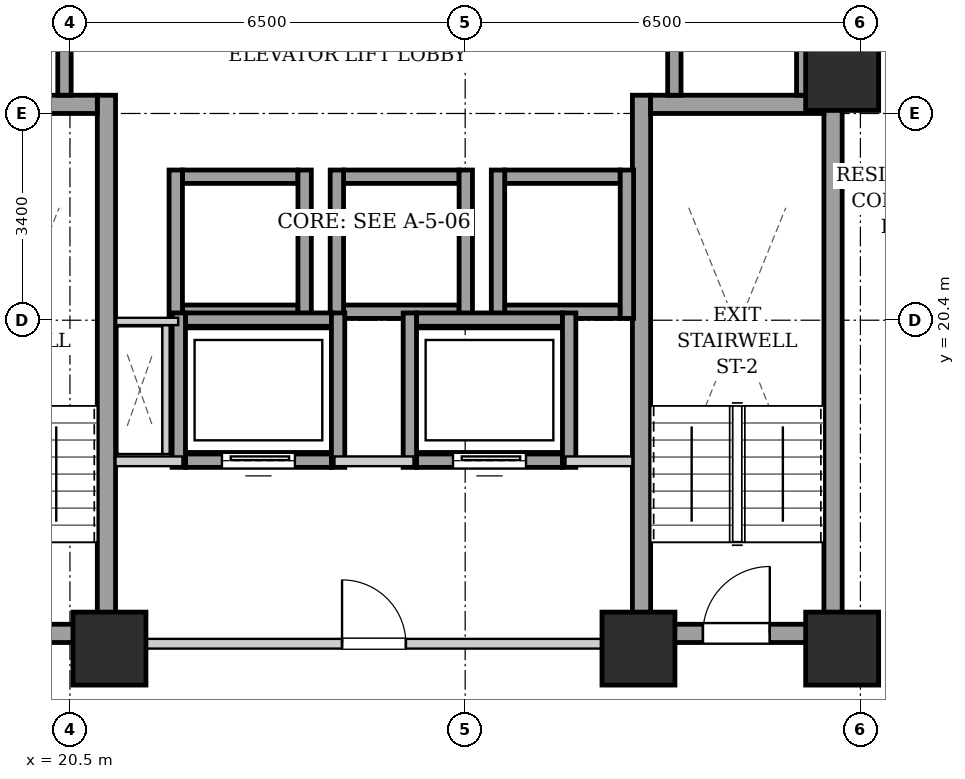
"""IFC4 building model, lengths in metres.
Left out: names, types, materials, properties, quantities, classifications, styles, units other than length and angle.
Written with IfcOpenShell. Run it as: python <this file> out.ifc"""

import sys

from ifc_helpers import new_model, si_unit, direction, frame, frame_2d, origin, origin_2d, place, context, subcontext, project, spatial, rectangle, extrude, element, fill, save


model = new_model("IFC4")
c1 = context("Model", 3, precision=1e-05, world=origin(), true_north=direction((0.0, 1.0)))
c2 = subcontext(c1, "Body", "Model", "MODEL_VIEW")
j1 = project(units=[si_unit("LENGTHUNIT", "METRE"), si_unit("PLANEANGLEUNIT", "RADIAN")], contexts=[c1])
p1 = place(None, origin())
s1 = spatial("IfcSite", under=j1, at=p1, CompositionType="ELEMENT")
p2 = place(p1, origin())
s2 = spatial("IfcBuilding", under=s1, at=p2, CompositionType="ELEMENT")
p3 = place(p2, frame((0.0, 0.0, 32.2)))
s3 = spatial("IfcBuildingStorey", under=s2, at=p3, CompositionType="ELEMENT", Elevation=32.2)
for number, where, z_axis, x_axis in (
    (1, (21.15, 15.0, 0.0), (0.0, 0.0, 1.0), (1.0, 0.0, 0.0)),
    (2, (29.85, 15.0, 0.0), (0.0, 0.0, 1.0), (1.0, 0.0, 0.0)),
    (3, (33.2, 15.0, 0.0), (0.0, 0.0, 1.0), (1.0, 0.0, 0.0)),
    (4, (33.2, 24.45, 0.0), (0.0, 0.0, 1.0), (1.0, 0.0, 0.0)),
):
    element("IfcColumn", number, at=place(p3, frame(where, z_axis=z_axis, x_axis=x_axis)), inside=s3, PredefinedType="COLUMN", context=c2, shape_type="SweptSolid", body=[
        extrude(rectangle(XDim=1.2, YDim=1.2, at=origin_2d()), origin(), (0.0, 0.0, 1.0), 3.2),
    ])
p4 = place(p3, frame((21.1, 15.1, 0.0), z_axis=(0.0, 0.0, 1.0), x_axis=(0.0, 1.0, 0.0)))
e5 = element("IfcWall", 5, at=p4, inside=s3, PredefinedType="SHEAR", context=c2, shape_type="SweptSolid", body=[
    extrude(rectangle(XDim=9.0, YDim=0.3, at=frame_2d((4.5, 0.0))), origin(), (0.0, 0.0, 1.0), 2.94),
])
p5 = place(p3, frame((18.1, 23.95, 0.0), z_axis=(0.0, 0.0, 1.0), x_axis=(1.0, 0.0, 0.0)))
e6 = element("IfcWall", 6, at=p5, inside=s3, PredefinedType="SHEAR", context=c2, shape_type="SweptSolid", body=[
    extrude(rectangle(XDim=2.85, YDim=0.3, at=frame_2d((1.425, 0.0))), origin(), (0.0, 0.0, 1.0), 2.94),
])
p6 = place(p3, frame((18.1, 15.25, 0.0), z_axis=(0.0, 0.0, 1.0), x_axis=(1.0, 0.0, 0.0)))
e7 = element("IfcWall", 7, at=p6, inside=s3, PredefinedType="SHEAR", context=c2, shape_type="SweptSolid", body=[
    extrude(rectangle(XDim=2.85, YDim=0.3, at=frame_2d((1.425, 0.0))), origin(), (0.0, 0.0, 1.0), 2.94),
])
p7 = place(p6, frame((0.86, 0.0, 0.0)))
e8 = element("IfcOpeningElement", 8, at=p7, cuts=e7, PredefinedType="OPENING", context=c2, shape_type="SweptSolid", body=[
    extrude(rectangle(XDim=1.1, YDim=2.05, at=frame_2d((0.55, 1.025))), frame((0.0, 0.16, 0.0), z_axis=(0.0, -1.0, 0.0), x_axis=(1.0, 0.0, 0.0)), (0.0, 0.0, 1.0), 0.32),
])
for number, where, z_axis, x_axis in (
    (9, (29.9, 15.1, 0.0), (0.0, 0.0, 1.0), (0.0, 1.0, 0.0)),
    (10, (33.05, 15.1, 0.0), (0.0, 0.0, 1.0), (0.0, 1.0, 0.0)),
):
    element("IfcWall", number, at=place(p3, frame(where, z_axis=z_axis, x_axis=x_axis)), inside=s3, PredefinedType="SHEAR", context=c2, shape_type="SweptSolid", body=[
        extrude(rectangle(XDim=9.0, YDim=0.3, at=frame_2d((4.5, 0.0))), origin(), (0.0, 0.0, 1.0), 2.94),
    ])
p8 = place(p3, frame((30.05, 23.95, 0.0), z_axis=(0.0, 0.0, 1.0), x_axis=(1.0, 0.0, 0.0)))
e11 = element("IfcWall", 11, at=p8, inside=s3, PredefinedType="SHEAR", context=c2, shape_type="SweptSolid", body=[
    extrude(rectangle(XDim=2.85, YDim=0.3, at=frame_2d((1.425, 0.0))), origin(), (0.0, 0.0, 1.0), 2.94),
])
p9 = place(p3, frame((30.05, 15.25, 0.0), z_axis=(0.0, 0.0, 1.0), x_axis=(1.0, 0.0, 0.0)))
e12 = element("IfcWall", 12, at=p9, inside=s3, PredefinedType="SHEAR", context=c2, shape_type="SweptSolid", body=[
    extrude(rectangle(XDim=2.85, YDim=0.3, at=frame_2d((1.425, 0.0))), origin(), (0.0, 0.0, 1.0), 2.94),
])
p10 = place(p9, frame((0.86, 0.0, 0.0)))
e13 = element("IfcOpeningElement", 13, at=p10, cuts=e12, PredefinedType="OPENING", context=c2, shape_type="SweptSolid", body=[
    extrude(rectangle(XDim=1.1, YDim=2.05, at=frame_2d((0.55, 1.025))), frame((0.0, 0.16, 0.0), z_axis=(0.0, -1.0, 0.0), x_axis=(1.0, 0.0, 0.0)), (0.0, 0.0, 1.0), 0.32),
])
for number, where, z_axis, x_axis in (
    (14, (22.35, 20.54, 0.0), (0.0, 0.0, 1.0), (1.0, 0.0, 0.0)),
    (15, (22.35, 22.76, 0.0), (0.0, 0.0, 1.0), (1.0, 0.0, 0.0)),
):
    element("IfcWall", number, at=place(p3, frame(where, z_axis=z_axis, x_axis=x_axis)), inside=s3, PredefinedType="SHEAR", context=c2, shape_type="SweptSolid", body=[
        extrude(rectangle(XDim=1.9, YDim=0.22, at=frame_2d((0.95, 0.0))), origin(), (0.0, 0.0, 1.0), 2.94),
    ])
for number, where, z_axis, x_axis in (
    (16, (22.24, 20.43, 0.0), (0.0, 0.0, 1.0), (0.0, 1.0, 0.0)),
    (17, (24.36, 20.43, 0.0), (0.0, 0.0, 1.0), (0.0, 1.0, 0.0)),
):
    element("IfcWall", number, at=place(p3, frame(where, z_axis=z_axis, x_axis=x_axis)), inside=s3, PredefinedType="SHEAR", context=c2, shape_type="SweptSolid", body=[
        extrude(rectangle(XDim=2.44, YDim=0.22, at=frame_2d((1.22, 0.0))), origin(), (0.0, 0.0, 1.0), 2.94),
    ])
for number, where, z_axis, x_axis in (
    (18, (25.0, 20.54, 0.0), (0.0, 0.0, 1.0), (1.0, 0.0, 0.0)),
    (19, (25.0, 22.76, 0.0), (0.0, 0.0, 1.0), (1.0, 0.0, 0.0)),
):
    element("IfcWall", number, at=place(p3, frame(where, z_axis=z_axis, x_axis=x_axis)), inside=s3, PredefinedType="SHEAR", context=c2, shape_type="SweptSolid", body=[
        extrude(rectangle(XDim=1.9, YDim=0.22, at=frame_2d((0.95, 0.0))), origin(), (0.0, 0.0, 1.0), 2.94),
    ])
for number, where, z_axis, x_axis in (
    (20, (24.89, 20.43, 0.0), (0.0, 0.0, 1.0), (0.0, 1.0, 0.0)),
    (21, (27.01, 20.43, 0.0), (0.0, 0.0, 1.0), (0.0, 1.0, 0.0)),
):
    element("IfcWall", number, at=place(p3, frame(where, z_axis=z_axis, x_axis=x_axis)), inside=s3, PredefinedType="SHEAR", context=c2, shape_type="SweptSolid", body=[
        extrude(rectangle(XDim=2.44, YDim=0.22, at=frame_2d((1.22, 0.0))), origin(), (0.0, 0.0, 1.0), 2.94),
    ])
for number, where, z_axis, x_axis in (
    (22, (27.65, 20.54, 0.0), (0.0, 0.0, 1.0), (1.0, 0.0, 0.0)),
    (23, (27.65, 22.76, 0.0), (0.0, 0.0, 1.0), (1.0, 0.0, 0.0)),
):
    element("IfcWall", number, at=place(p3, frame(where, z_axis=z_axis, x_axis=x_axis)), inside=s3, PredefinedType="SHEAR", context=c2, shape_type="SweptSolid", body=[
        extrude(rectangle(XDim=1.9, YDim=0.22, at=frame_2d((0.95, 0.0))), origin(), (0.0, 0.0, 1.0), 2.94),
    ])
for number, where, z_axis, x_axis in (
    (24, (27.54, 20.43, 0.0), (0.0, 0.0, 1.0), (0.0, 1.0, 0.0)),
    (25, (29.66, 20.43, 0.0), (0.0, 0.0, 1.0), (0.0, 1.0, 0.0)),
):
    element("IfcWall", number, at=place(p3, frame(where, z_axis=z_axis, x_axis=x_axis)), inside=s3, PredefinedType="SHEAR", context=c2, shape_type="SweptSolid", body=[
        extrude(rectangle(XDim=2.44, YDim=0.22, at=frame_2d((1.22, 0.0))), origin(), (0.0, 0.0, 1.0), 2.94),
    ])
p11 = place(p3, frame((20.41, 24.1, 0.0), z_axis=(0.0, 0.0, 1.0), x_axis=(0.0, 1.0, 0.0)))
e26 = element("IfcWall", 26, at=p11, inside=s3, PredefinedType="SHEAR", context=c2, shape_type="SweptSolid", body=[
    extrude(rectangle(XDim=1.96, YDim=0.22, at=frame_2d((0.98, 0.0))), origin(), (0.0, 0.0, 1.0), 2.94),
])
for number, where, z_axis, x_axis in (
    (27, (30.44, 24.1, 0.0), (0.0, 0.0, 1.0), (0.0, 1.0, 0.0)),
    (28, (32.56, 24.1, 0.0), (0.0, 0.0, 1.0), (0.0, 1.0, 0.0)),
):
    element("IfcWall", number, at=place(p3, frame(where, z_axis=z_axis, x_axis=x_axis)), inside=s3, PredefinedType="SHEAR", context=c2, shape_type="SweptSolid", body=[
        extrude(rectangle(XDim=2.07, YDim=0.22, at=frame_2d((1.035, 0.0))), origin(), (0.0, 0.0, 1.0), 2.94),
    ])
p12 = place(p3, frame((22.4, 18.09, 0.0), z_axis=(0.0, 0.0, 1.0), x_axis=(1.0, 0.0, 0.0)))
e29 = element("IfcWall", 29, at=p12, inside=s3, PredefinedType="SHEAR", context=c2, shape_type="SweptSolid", body=[
    extrude(rectangle(XDim=2.4, YDim=0.22, at=frame_2d((1.2, 0.0))), origin(), (0.0, 0.0, 1.0), 2.94),
])
p13 = place(p12, frame((0.6, 0.0, 0.0)))
e30 = element("IfcOpeningElement", 30, at=p13, cuts=e29, PredefinedType="OPENING", context=c2, shape_type="SweptSolid", body=[
    extrude(rectangle(XDim=1.2, YDim=2.15, at=frame_2d((0.6, 1.075))), frame((0.0, 0.12, 0.0), z_axis=(0.0, -1.0, 0.0), x_axis=(1.0, 0.0, 0.0)), (0.0, 0.0, 1.0), 0.24),
])
p14 = place(p3, frame((22.4, 20.41, 0.0), z_axis=(0.0, 0.0, 1.0), x_axis=(1.0, 0.0, 0.0)))
e31 = element("IfcWall", 31, at=p14, inside=s3, PredefinedType="SHEAR", context=c2, shape_type="SweptSolid", body=[
    extrude(rectangle(XDim=2.4, YDim=0.22, at=frame_2d((1.2, 0.0))), origin(), (0.0, 0.0, 1.0), 2.94),
])
for number, where, z_axis, x_axis in (
    (32, (22.29, 17.98, 0.0), (0.0, 0.0, 1.0), (0.0, 1.0, 0.0)),
    (33, (24.91, 17.98, 0.0), (0.0, 0.0, 1.0), (0.0, 1.0, 0.0)),
):
    element("IfcWall", number, at=place(p3, frame(where, z_axis=z_axis, x_axis=x_axis)), inside=s3, PredefinedType="SHEAR", context=c2, shape_type="SweptSolid", body=[
        extrude(rectangle(XDim=2.54, YDim=0.22, at=frame_2d((1.27, 0.0))), origin(), (0.0, 0.0, 1.0), 2.94),
    ])
p15 = place(p3, frame((26.2, 18.09, 0.0), z_axis=(0.0, 0.0, 1.0), x_axis=(1.0, 0.0, 0.0)))
e34 = element("IfcWall", 34, at=p15, inside=s3, PredefinedType="SHEAR", context=c2, shape_type="SweptSolid", body=[
    extrude(rectangle(XDim=2.4, YDim=0.22, at=frame_2d((1.2, 0.0))), origin(), (0.0, 0.0, 1.0), 2.94),
])
p16 = place(p15, frame((0.6, 0.0, 0.0)))
e35 = element("IfcOpeningElement", 35, at=p16, cuts=e34, PredefinedType="OPENING", context=c2, shape_type="SweptSolid", body=[
    extrude(rectangle(XDim=1.2, YDim=2.15, at=frame_2d((0.6, 1.075))), frame((0.0, 0.12, 0.0), z_axis=(0.0, -1.0, 0.0), x_axis=(1.0, 0.0, 0.0)), (0.0, 0.0, 1.0), 0.24),
])
p17 = place(p3, frame((26.2, 20.41, 0.0), z_axis=(0.0, 0.0, 1.0), x_axis=(1.0, 0.0, 0.0)))
e36 = element("IfcWall", 36, at=p17, inside=s3, PredefinedType="SHEAR", context=c2, shape_type="SweptSolid", body=[
    extrude(rectangle(XDim=2.4, YDim=0.22, at=frame_2d((1.2, 0.0))), origin(), (0.0, 0.0, 1.0), 2.94),
])
for number, where, z_axis, x_axis in (
    (37, (26.09, 17.98, 0.0), (0.0, 0.0, 1.0), (0.0, 1.0, 0.0)),
    (38, (28.71, 17.98, 0.0), (0.0, 0.0, 1.0), (0.0, 1.0, 0.0)),
):
    element("IfcWall", number, at=place(p3, frame(where, z_axis=z_axis, x_axis=x_axis)), inside=s3, PredefinedType="SHEAR", context=c2, shape_type="SweptSolid", body=[
        extrude(rectangle(XDim=2.54, YDim=0.22, at=frame_2d((1.27, 0.0))), origin(), (0.0, 0.0, 1.0), 2.94),
    ])
p18 = place(p3, frame((21.25, 15.08, 0.0), z_axis=(0.0, 0.0, 1.0), x_axis=(1.0, 0.0, 0.0)))
e39 = element("IfcWall", 39, at=p18, inside=s3, PredefinedType="PARTITIONING", context=c2, shape_type="SweptSolid", body=[
    extrude(rectangle(XDim=8.5, YDim=0.16, at=frame_2d((4.25, 0.0))), origin(), (0.0, 0.0, 1.0), 2.155),
])
p19 = place(p18, frame((3.725, 0.0, 0.0)))
e40 = element("IfcOpeningElement", 40, at=p19, cuts=e39, PredefinedType="OPENING", context=c2, shape_type="SweptSolid", body=[
    extrude(rectangle(XDim=1.05, YDim=2.05, at=frame_2d((0.525, 1.025))), frame((0.0, 0.09, 0.0), z_axis=(0.0, -1.0, 0.0), x_axis=(1.0, 0.0, 0.0)), (0.0, 0.0, 1.0), 0.18),
])
p20 = place(p3, frame((21.25, 18.08, 0.0), z_axis=(0.0, 0.0, 1.0), x_axis=(1.0, 0.0, 0.0)))
e41 = element("IfcWall", 41, at=p20, inside=s3, PredefinedType="PARTITIONING", context=c2, shape_type="SweptSolid", body=[
    extrude(rectangle(XDim=1.1, YDim=0.16, at=frame_2d((0.55, 0.0))), origin(), (0.0, 0.0, 1.0), 2.94),
])
p21 = place(p3, frame((24.85, 18.08, 0.0), z_axis=(0.0, 0.0, 1.0), x_axis=(1.0, 0.0, 0.0)))
e42 = element("IfcWall", 42, at=p21, inside=s3, PredefinedType="PARTITIONING", context=c2, shape_type="SweptSolid", body=[
    extrude(rectangle(XDim=1.3, YDim=0.16, at=frame_2d((0.65, 0.0))), origin(), (0.0, 0.0, 1.0), 2.94),
])
p22 = place(p3, frame((28.65, 18.08, 0.0), z_axis=(0.0, 0.0, 1.0), x_axis=(1.0, 0.0, 0.0)))
e43 = element("IfcWall", 43, at=p22, inside=s3, PredefinedType="PARTITIONING", context=c2, shape_type="SweptSolid", body=[
    extrude(rectangle(XDim=1.1, YDim=0.16, at=frame_2d((0.55, 0.0))), origin(), (0.0, 0.0, 1.0), 2.94),
])
p23 = place(p3, frame((33.12, 24.12, 0.0), z_axis=(0.0, 0.0, 1.0), x_axis=(0.0, 1.0, 0.0)))
e44 = element("IfcWall", 44, at=p23, inside=s3, PredefinedType="PARTITIONING", context=c2, shape_type="SweptSolid", body=[
    extrude(rectangle(XDim=4.76, YDim=0.16, at=frame_2d((2.38, 0.0))), origin(), (0.0, 0.0, 1.0), 2.94),
])
p24 = place(p3, frame((22.08, 18.2, 0.0), z_axis=(0.0, 0.0, 1.0), x_axis=(0.0, 1.0, 0.0)))
e45 = element("IfcWall", 45, at=p24, inside=s3, PredefinedType="PARTITIONING", context=c2, shape_type="SweptSolid", body=[
    extrude(rectangle(XDim=2.12, YDim=0.12, at=frame_2d((1.06, 0.0))), origin(), (0.0, 0.0, 1.0), 2.94),
])
p25 = place(p3, frame((22.28, 20.38, 0.0), z_axis=(0.0, 0.0, 1.0), x_axis=(-1.0, 0.0, 0.0)))
e46 = element("IfcWall", 46, at=p25, inside=s3, PredefinedType="PARTITIONING", context=c2, shape_type="SweptSolid", body=[
    extrude(rectangle(XDim=1.02, YDim=0.12, at=frame_2d((0.51, 0.0))), origin(), (0.0, 0.0, 1.0), 2.94),
])
p26 = place(p10, origin())
e47 = element("IfcDoor", 47, at=p26, inside=s3, OperationType="SINGLE_SWING_RIGHT", PredefinedType="DOOR", context=c2, shape_type="SweptSolid", body=[
    extrude(rectangle(XDim=1.1, YDim=2.05, at=frame_2d((0.55, 1.025))), frame((0.0, 0.025, 0.0), z_axis=(0.0, -1.0, 0.0), x_axis=(1.0, 0.0, 0.0)), (0.0, 0.0, 1.0), 0.05),
])
fill(e13, e47)
p27 = place(p13, origin())
e48 = element("IfcDoor", 48, at=p27, inside=s3, OperationType="SLIDING_TO_LEFT", PredefinedType="DOOR", context=c2, shape_type="SweptSolid", body=[
    extrude(rectangle(XDim=1.2, YDim=2.15, at=frame_2d((0.6, 1.075))), frame((0.0, 0.025, 0.0), z_axis=(0.0, -1.0, 0.0), x_axis=(1.0, 0.0, 0.0)), (0.0, 0.0, 1.0), 0.05),
])
fill(e30, e48)
p28 = place(p16, origin())
e49 = element("IfcDoor", 49, at=p28, inside=s3, OperationType="SLIDING_TO_LEFT", PredefinedType="DOOR", context=c2, shape_type="SweptSolid", body=[
    extrude(rectangle(XDim=1.2, YDim=2.15, at=frame_2d((0.6, 1.075))), frame((0.0, 0.025, 0.0), z_axis=(0.0, -1.0, 0.0), x_axis=(1.0, 0.0, 0.0)), (0.0, 0.0, 1.0), 0.05),
])
fill(e35, e49)
p29 = place(p19, origin())
e50 = element("IfcDoor", 50, at=p29, inside=s3, OperationType="SINGLE_SWING_LEFT", PredefinedType="DOOR", context=c2, shape_type="SweptSolid", body=[
    extrude(rectangle(XDim=1.05, YDim=2.05, at=frame_2d((0.525, 1.025))), frame((0.0, 0.025, 0.0), z_axis=(0.0, -1.0, 0.0), x_axis=(1.0, 0.0, 0.0)), (0.0, 0.0, 1.0), 0.05),
])
fill(e40, e50)
save(model, sys.argv[1])
